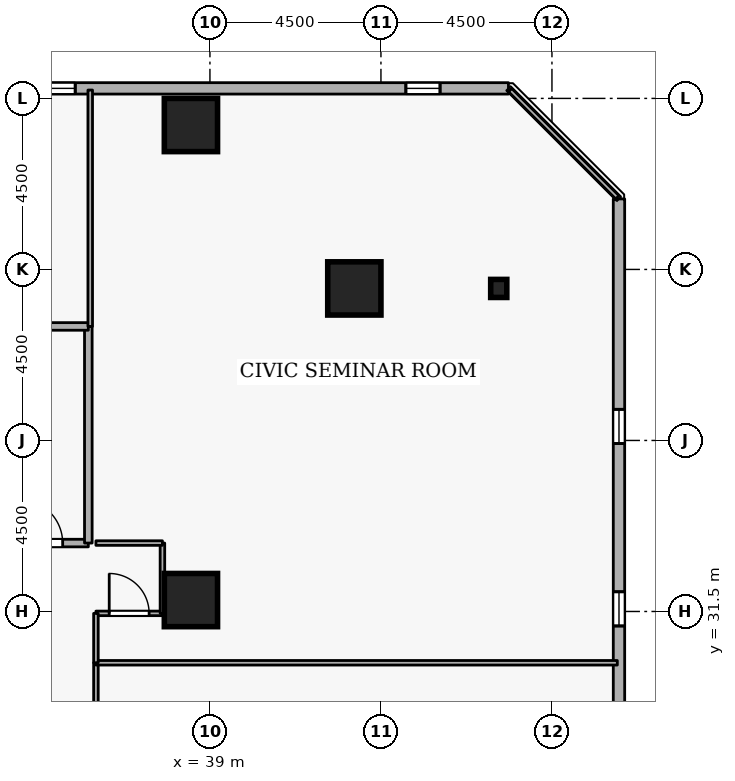
"""IFC4 building model, lengths in metres.
Left out: names, types, materials, properties, quantities, classifications, styles, units other than length and angle.
Written with IfcOpenShell. Run it as: python <this file> out.ifc"""

import sys

from ifc_helpers import new_model, si_unit, direction, frame, frame_2d, origin, origin_2d, place, context, subcontext, project, spatial, rectangle, i_section, extrude, element, fill, save


model = new_model("IFC4")
c1 = context("Model", 3, precision=1e-05, world=origin(), true_north=direction((0.0, 1.0)))
c2 = subcontext(c1, "Body", "Model", "MODEL_VIEW")
j1 = project(units=[si_unit("LENGTHUNIT", "METRE"), si_unit("PLANEANGLEUNIT", "RADIAN")], contexts=[c1])
p1 = place(None, origin())
s1 = spatial("IfcSite", under=j1, at=p1, CompositionType="ELEMENT")
p2 = place(p1, origin())
s2 = spatial("IfcBuilding", under=s1, at=p2, CompositionType="ELEMENT")
p3 = place(p2, frame((0.0, 0.0, 64.5)))
s3 = spatial("IfcBuildingStorey", under=s2, at=p3, CompositionType="ELEMENT", Elevation=64.5)
for number, where, z_axis, x_axis in (
    (1, (42.8, 40.0, 0.0), (0.0, 0.0, 1.0), (1.0, 0.0, 0.0)),
    (2, (38.5, 44.3, 0.0), (0.0, 0.0, 1.0), (1.0, 0.0, 0.0)),
    (3, (38.5, 31.8, 0.0), (0.0, 0.0, 1.0), (1.0, 0.0, 0.0)),
):
    element("IfcColumn", number, at=place(p3, frame(where, z_axis=z_axis, x_axis=x_axis)), inside=s3, PredefinedType="COLUMN", context=c2, shape_type="SweptSolid", body=[
        extrude(rectangle(XDim=1.4, YDim=1.4, at=origin_2d()), origin(), (0.0, 0.0, 1.0), 3.6),
    ])
p4 = place(p3, frame((46.6, 40.0, 0.0), z_axis=(0.0, 0.0, 1.0), x_axis=(1.0, 0.0, 0.0)))
e4 = element("IfcColumn", 4, at=p4, inside=s3, PredefinedType="COLUMN", context=c2, shape_type="SweptSolid", body=[
    extrude(i_section(OverallWidth=0.424, OverallDepth=0.475, WebThickness=0.048, FlangeThickness=0.077, FilletRadius=0.015, at=origin_2d()), origin(), (0.0, 0.0, 1.0), 3.6),
])
p5 = place(p3, frame((49.765, 5.319, 0.0), z_axis=(0.0, 0.0, 1.0), x_axis=(-3.2959355e-05, 0.999999999457, 0.0)))
e5 = element("IfcWall", 5, at=p5, inside=s3, PredefinedType="STANDARD", context=c2, shape_type="SweptSolid", body=[
    extrude(rectangle(XDim=37.037, YDim=0.3, at=frame_2d((18.518, 0.0))), origin(), (0.0, 0.0, 1.0), 2.7),
])
p6 = place(p5, frame((1.8, 0.0, 0.72)))
e6 = element("IfcOpeningElement", 6, at=p6, cuts=e5, PredefinedType="OPENING", context=c2, shape_type="SweptSolid", body=[
    extrude(rectangle(XDim=0.9, YDim=1.75, at=frame_2d((0.45, 0.875))), frame((0.0, 0.16, 0.0), z_axis=(0.0, -1.0, 0.0), x_axis=(1.0, 0.0, 0.0)), (0.0, 0.0, 1.0), 0.32),
])
p7 = place(p5, frame((6.6, 0.0, 0.72)))
e7 = element("IfcOpeningElement", 7, at=p7, cuts=e5, PredefinedType="OPENING", context=c2, shape_type="SweptSolid", body=[
    extrude(rectangle(XDim=0.9, YDim=1.75, at=frame_2d((0.45, 0.875))), frame((0.0, 0.16, 0.0), z_axis=(0.0, -1.0, 0.0), x_axis=(1.0, 0.0, 0.0)), (0.0, 0.0, 1.0), 0.32),
])
p8 = place(p5, frame((11.4, 0.0, 0.72)))
e8 = element("IfcOpeningElement", 8, at=p8, cuts=e5, PredefinedType="OPENING", context=c2, shape_type="SweptSolid", body=[
    extrude(rectangle(XDim=0.9, YDim=1.75, at=frame_2d((0.45, 0.875))), frame((0.0, 0.16, 0.0), z_axis=(0.0, -1.0, 0.0), x_axis=(1.0, 0.0, 0.0)), (0.0, 0.0, 1.0), 0.32),
])
p9 = place(p5, frame((16.2, 0.0, 0.72)))
e9 = element("IfcOpeningElement", 9, at=p9, cuts=e5, PredefinedType="OPENING", context=c2, shape_type="SweptSolid", body=[
    extrude(rectangle(XDim=0.9, YDim=1.75, at=frame_2d((0.45, 0.875))), frame((0.0, 0.16, 0.0), z_axis=(0.0, -1.0, 0.0), x_axis=(1.0, 0.0, 0.0)), (0.0, 0.0, 1.0), 0.32),
])
p10 = place(p5, frame((25.8, 0.0, 0.72)))
e10 = element("IfcOpeningElement", 10, at=p10, cuts=e5, PredefinedType="OPENING", context=c2, shape_type="SweptSolid", body=[
    extrude(rectangle(XDim=0.9, YDim=1.75, at=frame_2d((0.45, 0.875))), frame((0.0, 0.16, 0.0), z_axis=(0.0, -1.0, 0.0), x_axis=(1.0, 0.0, 0.0)), (0.0, 0.0, 1.0), 0.32),
])
p11 = place(p5, frame((30.6, 0.0, 0.72)))
e11 = element("IfcOpeningElement", 11, at=p11, cuts=e5, PredefinedType="OPENING", context=c2, shape_type="SweptSolid", body=[
    extrude(rectangle(XDim=0.9, YDim=1.75, at=frame_2d((0.45, 0.875))), frame((0.0, 0.16, 0.0), z_axis=(0.0, -1.0, 0.0), x_axis=(1.0, 0.0, 0.0)), (0.0, 0.0, 1.0), 0.32),
])
p12 = place(p3, frame((46.855, 45.264, 0.0), z_axis=(0.0, 0.0, 1.0), x_axis=(-0.999999999457, 3.2959355e-05, 0.0)))
e12 = element("IfcWall", 12, at=p12, inside=s3, PredefinedType="STANDARD", context=c2, shape_type="SweptSolid", body=[
    extrude(rectangle(XDim=37.037, YDim=0.3, at=frame_2d((18.518, 0.0))), origin(), (0.0, 0.0, 1.0), 2.7),
])
p13 = place(p12, frame((1.8, 0.0, 0.72)))
e13 = element("IfcOpeningElement", 13, at=p13, cuts=e12, PredefinedType="OPENING", context=c2, shape_type="SweptSolid", body=[
    extrude(rectangle(XDim=0.9, YDim=1.75, at=frame_2d((0.45, 0.875))), frame((0.0, 0.16, 0.0), z_axis=(0.0, -1.0, 0.0), x_axis=(1.0, 0.0, 0.0)), (0.0, 0.0, 1.0), 0.32),
])
p14 = place(p12, frame((11.4, 0.0, 0.72)))
e14 = element("IfcOpeningElement", 14, at=p14, cuts=e12, PredefinedType="OPENING", context=c2, shape_type="SweptSolid", body=[
    extrude(rectangle(XDim=0.9, YDim=1.75, at=frame_2d((0.45, 0.875))), frame((0.0, 0.16, 0.0), z_axis=(0.0, -1.0, 0.0), x_axis=(1.0, 0.0, 0.0)), (0.0, 0.0, 1.0), 0.32),
])
p15 = place(p12, frame((16.2, 0.0, 0.72)))
e15 = element("IfcOpeningElement", 15, at=p15, cuts=e12, PredefinedType="OPENING", context=c2, shape_type="SweptSolid", body=[
    extrude(rectangle(XDim=0.9, YDim=1.75, at=frame_2d((0.45, 0.875))), frame((0.0, 0.16, 0.0), z_axis=(0.0, -1.0, 0.0), x_axis=(1.0, 0.0, 0.0)), (0.0, 0.0, 1.0), 0.32),
])
p16 = place(p12, frame((25.8, 0.0, 0.72)))
e16 = element("IfcOpeningElement", 16, at=p16, cuts=e12, PredefinedType="OPENING", context=c2, shape_type="SweptSolid", body=[
    extrude(rectangle(XDim=0.9, YDim=1.75, at=frame_2d((0.45, 0.875))), frame((0.0, 0.16, 0.0), z_axis=(0.0, -1.0, 0.0), x_axis=(1.0, 0.0, 0.0)), (0.0, 0.0, 1.0), 0.32),
])
p17 = place(p12, frame((30.6, 0.0, 0.72)))
e17 = element("IfcOpeningElement", 17, at=p17, cuts=e12, PredefinedType="OPENING", context=c2, shape_type="SweptSolid", body=[
    extrude(rectangle(XDim=0.9, YDim=1.75, at=frame_2d((0.45, 0.875))), frame((0.0, 0.16, 0.0), z_axis=(0.0, -1.0, 0.0), x_axis=(1.0, 0.0, 0.0)), (0.0, 0.0, 1.0), 0.32),
])
p18 = place(p3, frame((33.3, 33.3, 0.0), z_axis=(0.0, 0.0, 1.0), x_axis=(1.0, 0.0, 0.0)))
e18 = element("IfcWall", 18, at=p18, inside=s3, PredefinedType="STANDARD", context=c2, shape_type="SweptSolid", body=[
    extrude(rectangle(XDim=2.5, YDim=0.2, at=frame_2d((1.25, 0.0))), origin(), (0.0, 0.0, 1.0), 3.34),
])
p19 = place(p18, frame((0.675, 0.0, 0.0)))
e19 = element("IfcOpeningElement", 19, at=p19, cuts=e18, PredefinedType="OPENING", context=c2, shape_type="SweptSolid", body=[
    extrude(rectangle(XDim=1.15, YDim=2.1, at=frame_2d((0.575, 1.05))), frame((0.0, 0.11, 0.0), z_axis=(0.0, -1.0, 0.0), x_axis=(1.0, 0.0, 0.0)), (0.0, 0.0, 1.0), 0.22),
])
p20 = place(p3, frame((35.8, 33.3, 0.0), z_axis=(0.0, 0.0, 1.0), x_axis=(0.0, 1.0, 0.0)))
e20 = element("IfcWall", 20, at=p20, inside=s3, PredefinedType="STANDARD", context=c2, shape_type="SweptSolid", body=[
    extrude(rectangle(XDim=5.7, YDim=0.2, at=frame_2d((2.85, 0.0))), origin(), (0.0, 0.0, 1.0), 3.34),
])
p21 = place(p3, frame((35.8, 39.0, 0.0), z_axis=(0.0, 0.0, 1.0), x_axis=(-1.0, 0.0, 0.0)))
e21 = element("IfcWall", 21, at=p21, inside=s3, PredefinedType="STANDARD", context=c2, shape_type="SweptSolid", body=[
    extrude(rectangle(XDim=2.5, YDim=0.2, at=frame_2d((1.25, 0.0))), origin(), (0.0, 0.0, 1.0), 3.34),
])
p22 = place(p3, frame((36.0, 27.0, 0.0), z_axis=(0.0, 0.0, 1.0), x_axis=(0.0, 1.0, 0.0)))
e22 = element("IfcWall", 22, at=p22, inside=s3, PredefinedType="PARTITIONING", context=c2, shape_type="SweptSolid", body=[
    extrude(rectangle(XDim=3.15, YDim=0.12, at=frame_2d((1.575, 0.0))), origin(), (0.0, 0.0, 1.0), 3.34),
])
p23 = place(p22, frame((1.1, 0.0, 0.0)))
e23 = element("IfcOpeningElement", 23, at=p23, cuts=e22, PredefinedType="OPENING", context=c2, shape_type="SweptSolid", body=[
    extrude(rectangle(XDim=0.95, YDim=2.1, at=frame_2d((0.475, 1.05))), frame((0.0, 0.07, 0.0), z_axis=(0.0, -1.0, 0.0), x_axis=(1.0, 0.0, 0.0)), (0.0, 0.0, 1.0), 0.14),
])
p24 = place(p3, frame((36.0, 30.15, 0.0), z_axis=(0.0, 0.0, 1.0), x_axis=(1.0, 0.0, 0.0)))
e24 = element("IfcWall", 24, at=p24, inside=s3, PredefinedType="PARTITIONING", context=c2, shape_type="SweptSolid", body=[
    extrude(rectangle(XDim=13.72, YDim=0.12, at=frame_2d((6.86, 0.0))), origin(), (0.0, 0.0, 1.0), 3.34),
])
p25 = place(p3, frame((36.0, 31.45, 0.0), z_axis=(0.0, 0.0, 1.0), x_axis=(1.0, 0.0, 0.0)))
e25 = element("IfcWall", 25, at=p25, inside=s3, PredefinedType="PARTITIONING", context=c2, shape_type="SweptSolid", body=[
    extrude(rectangle(XDim=1.75, YDim=0.12, at=frame_2d((0.875, 0.0))), origin(), (0.0, 0.0, 1.0), 3.34),
])
p26 = place(p25, frame((0.35, 0.0, 0.0)))
e26 = element("IfcOpeningElement", 26, at=p26, cuts=e25, PredefinedType="OPENING", context=c2, shape_type="SweptSolid", body=[
    extrude(rectangle(XDim=1.05, YDim=2.1, at=frame_2d((0.525, 1.05))), frame((0.0, 0.07, 0.0), z_axis=(0.0, -1.0, 0.0), x_axis=(1.0, 0.0, 0.0)), (0.0, 0.0, 1.0), 0.14),
])
p27 = place(p3, frame((37.75, 31.45, 0.0), z_axis=(0.0, 0.0, 1.0), x_axis=(0.0, 1.0, 0.0)))
e27 = element("IfcWall", 27, at=p27, inside=s3, PredefinedType="PARTITIONING", context=c2, shape_type="SweptSolid", body=[
    extrude(rectangle(XDim=1.85, YDim=0.12, at=frame_2d((0.925, 0.0))), origin(), (0.0, 0.0, 1.0), 3.34),
])
p28 = place(p3, frame((37.75, 33.3, 0.0), z_axis=(0.0, 0.0, 1.0), x_axis=(-1.0, 0.0, 0.0)))
e28 = element("IfcWall", 28, at=p28, inside=s3, PredefinedType="PARTITIONING", context=c2, shape_type="SweptSolid", body=[
    extrude(rectangle(XDim=1.75, YDim=0.12, at=frame_2d((0.875, 0.0))), origin(), (0.0, 0.0, 1.0), 3.34),
])
p29 = place(p3, frame((35.85, 39.0, 0.0), z_axis=(0.0, 0.0, 1.0), x_axis=(0.0, 1.0, 0.0)))
e29 = element("IfcWall", 29, at=p29, inside=s3, PredefinedType="PARTITIONING", context=c2, shape_type="SweptSolid", body=[
    extrude(rectangle(XDim=6.22, YDim=0.12, at=frame_2d((3.11, 0.0))), origin(), (0.0, 0.0, 1.0), 3.34),
])
p30 = place(p3, frame((46.898, 45.22, 0.0), z_axis=(0.0, 0.0, 1.0), x_axis=(0.707106781187, -0.707106781187, 0.0)))
e30 = element("IfcWall", 30, at=p30, inside=s3, PredefinedType="PARTITIONING", context=c2, shape_type="SweptSolid", body=[
    extrude(rectangle(XDim=3.99, YDim=0.12, at=frame_2d((1.995, 0.0))), origin(), (0.0, 0.0, 1.0), 3.34),
])
p31 = place(p3, frame((36.0, 30.15, 0.0), z_axis=(0.0, 0.0, 1.0), x_axis=(0.0, 1.0, 0.0)))
e31 = element("IfcWall", 31, at=p31, inside=s3, PredefinedType="PARTITIONING", context=c2, shape_type="SweptSolid", body=[
    extrude(rectangle(XDim=1.3, YDim=0.12, at=frame_2d((0.65, 0.0))), origin(), (0.0, 0.0, 1.0), 3.34),
])
p32 = place(p10, origin())
e32 = element("IfcWindow", 32, at=p32, inside=s3, PartitioningType="SINGLE_PANEL", PredefinedType="WINDOW", context=c2, shape_type="SweptSolid", body=[
    extrude(rectangle(XDim=0.9, YDim=1.75, at=frame_2d((0.45, 0.875))), frame((0.0, 0.03, 0.0), z_axis=(0.0, -1.0, 0.0), x_axis=(1.0, 0.0, 0.0)), (0.0, 0.0, 1.0), 0.06),
])
fill(e10, e32)
p33 = place(p11, origin())
e33 = element("IfcWindow", 33, at=p33, inside=s3, PartitioningType="SINGLE_PANEL", PredefinedType="WINDOW", context=c2, shape_type="SweptSolid", body=[
    extrude(rectangle(XDim=0.9, YDim=1.75, at=frame_2d((0.45, 0.875))), frame((0.0, 0.03, 0.0), z_axis=(0.0, -1.0, 0.0), x_axis=(1.0, 0.0, 0.0)), (0.0, 0.0, 1.0), 0.06),
])
fill(e11, e33)
p34 = place(p13, origin())
e34 = element("IfcWindow", 34, at=p34, inside=s3, PartitioningType="SINGLE_PANEL", PredefinedType="WINDOW", context=c2, shape_type="SweptSolid", body=[
    extrude(rectangle(XDim=0.9, YDim=1.75, at=frame_2d((0.45, 0.875))), frame((0.0, 0.03, 0.0), z_axis=(0.0, -1.0, 0.0), x_axis=(1.0, 0.0, 0.0)), (0.0, 0.0, 1.0), 0.06),
])
fill(e13, e34)
p35 = place(p14, origin())
e35 = element("IfcWindow", 35, at=p35, inside=s3, PartitioningType="SINGLE_PANEL", PredefinedType="WINDOW", context=c2, shape_type="SweptSolid", body=[
    extrude(rectangle(XDim=0.9, YDim=1.75, at=frame_2d((0.45, 0.875))), frame((0.0, 0.03, 0.0), z_axis=(0.0, -1.0, 0.0), x_axis=(1.0, 0.0, 0.0)), (0.0, 0.0, 1.0), 0.06),
])
fill(e14, e35)
p36 = place(p19, origin())
e36 = element("IfcDoor", 36, at=p36, inside=s3, OperationType="SINGLE_SWING_LEFT", PredefinedType="DOOR", context=c2, shape_type="SweptSolid", body=[
    extrude(rectangle(XDim=1.15, YDim=2.1, at=frame_2d((0.575, 1.05))), frame((0.0, 0.025, 0.0), z_axis=(0.0, -1.0, 0.0), x_axis=(1.0, 0.0, 0.0)), (0.0, 0.0, 1.0), 0.05),
])
fill(e19, e36)
p37 = place(p26, origin())
e37 = element("IfcDoor", 37, at=p37, inside=s3, OperationType="SINGLE_SWING_LEFT", PredefinedType="DOOR", context=c2, shape_type="SweptSolid", body=[
    extrude(rectangle(XDim=1.05, YDim=2.1, at=frame_2d((0.525, 1.05))), frame((0.0, 0.025, 0.0), z_axis=(0.0, -1.0, 0.0), x_axis=(1.0, 0.0, 0.0)), (0.0, 0.0, 1.0), 0.05),
])
fill(e26, e37)
save(model, sys.argv[1])
